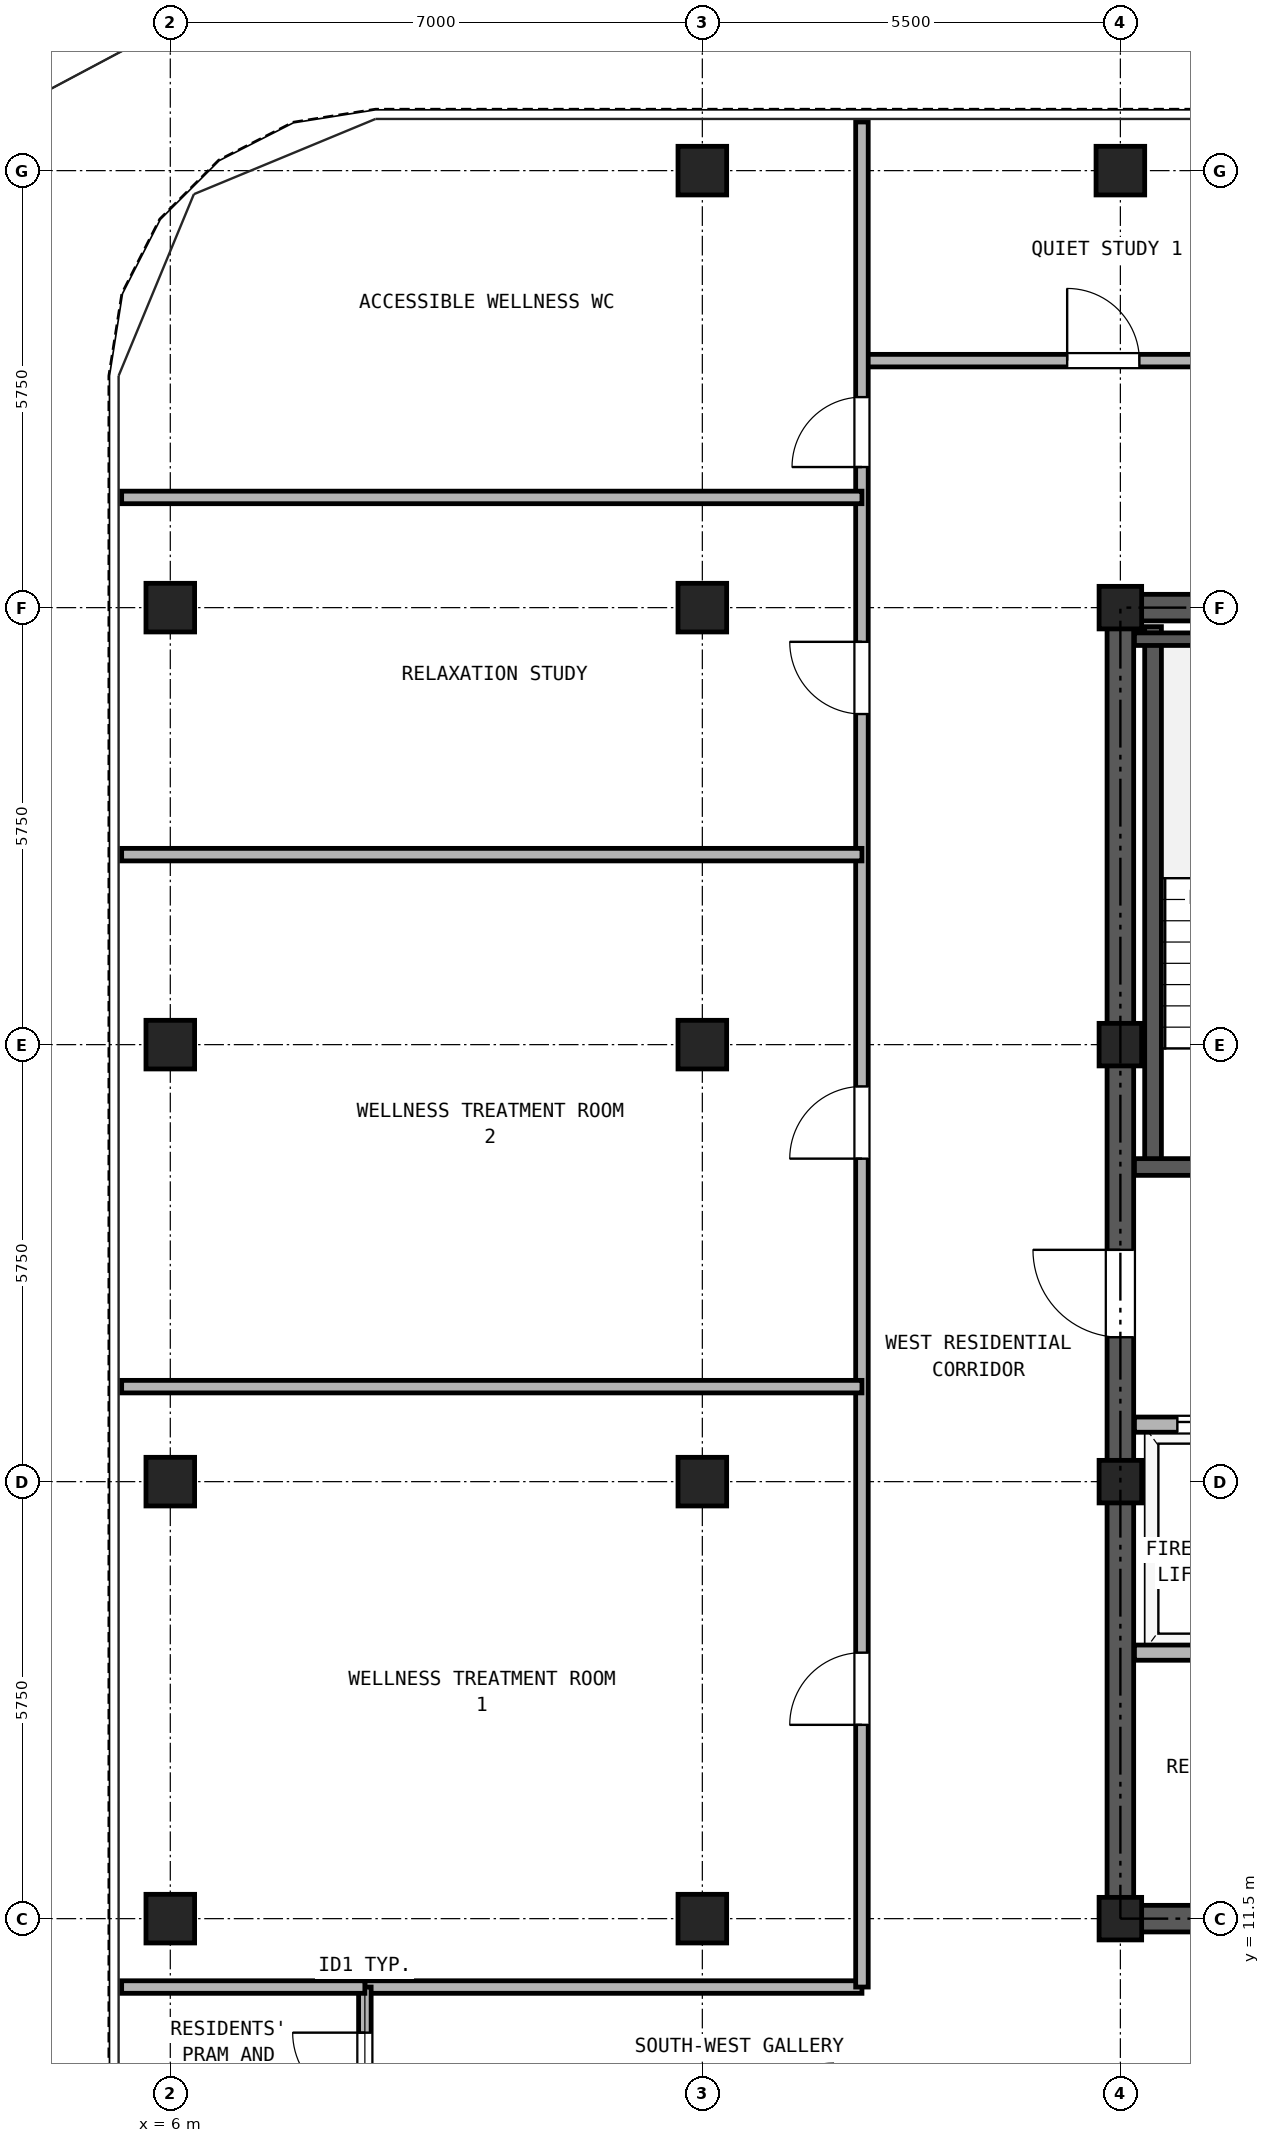
"""IFC4 building model, lengths in metres.
Left out: names, types, materials, properties, quantities, classifications, styles, units other than length and angle.
Written with IfcOpenShell. Run it as: python <this file> out.ifc"""

import sys

from ifc_helpers import new_model, si_unit, direction, frame, frame_2d, origin, origin_2d, place, context, subcontext, project, spatial, rectangle, hollow_rectangle, extrude, source, transform, mapped, element, fill, save


model = new_model("IFC4")
c1 = context("Model", 3, precision=1e-05, world=origin(), true_north=direction((0.0, 1.0)))
c2 = subcontext(c1, "Body", "Model", "MODEL_VIEW")
j1 = project(units=[si_unit("LENGTHUNIT", "METRE"), si_unit("PLANEANGLEUNIT", "RADIAN")], contexts=[c1])
p1 = place(None, origin())
s1 = spatial("IfcSite", under=j1, at=p1, CompositionType="ELEMENT")
p2 = place(p1, origin())
s2 = spatial("IfcBuilding", under=s1, at=p2, CompositionType="ELEMENT")
p3 = place(p2, frame((0.0, 0.0, 255.3)))
s3 = spatial("IfcBuildingStorey", under=s2, at=p3, CompositionType="ELEMENT", Elevation=255.3)
m1 = source(origin(), c2, "Body", "SweptSolid", [
    extrude(hollow_rectangle(XDim=0.64, YDim=0.64, WallThickness=0.035, at=origin_2d()), origin(), (0.0, 0.0, 1.0), 2.98),
])
for number, where, z_axis, x_axis in (
    (1, (13.0, 34.5, 0.0), (0.0, 0.0, 1.0), (1.0, 0.0, 0.0)),
    (2, (18.5, 34.5, 0.0), (0.0, 0.0, 1.0), (1.0, 0.0, 0.0)),
    (3, (6.0, 11.5, 0.0), (0.0, 0.0, 1.0), (1.0, 0.0, 0.0)),
    (4, (6.0, 17.25, 0.0), (0.0, 0.0, 1.0), (1.0, 0.0, 0.0)),
    (5, (6.0, 23.0, 0.0), (0.0, 0.0, 1.0), (1.0, 0.0, 0.0)),
    (6, (6.0, 28.75, 0.0), (0.0, 0.0, 1.0), (1.0, 0.0, 0.0)),
    (7, (13.0, 11.5, 0.0), (0.0, 0.0, 1.0), (1.0, 0.0, 0.0)),
    (8, (13.0, 17.25, 0.0), (0.0, 0.0, 1.0), (1.0, 0.0, 0.0)),
    (9, (13.0, 23.0, 0.0), (0.0, 0.0, 1.0), (1.0, 0.0, 0.0)),
    (10, (13.0, 28.75, 0.0), (0.0, 0.0, 1.0), (1.0, 0.0, 0.0)),
):
    element("IfcColumn", number, at=place(p3, frame(where, z_axis=z_axis, x_axis=x_axis)), inside=s3, PredefinedType="COLUMN", context=c2, shape_type="MappedRepresentation", body=[
        mapped(m1, transform((0.0, 0.0, 0.0), x_axis=(1.0, 0.0, 0.0), y_axis=(0.0, 1.0, 0.0), z_axis=(0.0, 0.0, 1.0), scale=1.0)),
    ])
m2 = source(origin(), c2, "Body", "SweptSolid", [
    extrude(hollow_rectangle(XDim=0.56, YDim=0.56, WallThickness=0.03, at=origin_2d()), origin(), (0.0, 0.0, 1.0), 2.98),
])
for number, where, z_axis, x_axis in (
    (11, (18.5, 11.5, 0.0), (0.0, 0.0, 1.0), (1.0, 0.0, 0.0)),
    (12, (18.5, 17.25, 0.0), (0.0, 0.0, 1.0), (1.0, 0.0, 0.0)),
    (13, (18.5, 23.0, 0.0), (0.0, 0.0, 1.0), (1.0, 0.0, 0.0)),
    (14, (18.5, 28.75, 0.0), (0.0, 0.0, 1.0), (1.0, 0.0, 0.0)),
):
    element("IfcColumn", number, at=place(p3, frame(where, z_axis=z_axis, x_axis=x_axis)), inside=s3, PredefinedType="COLUMN", context=c2, shape_type="MappedRepresentation", body=[
        mapped(m2, transform((0.0, 0.0, 0.0), x_axis=(1.0, 0.0, 0.0), y_axis=(0.0, 1.0, 0.0), z_axis=(0.0, 0.0, 1.0), scale=1.0)),
    ])
p4 = place(p3, frame((18.325, 11.5, 0.0), z_axis=(0.0, 0.0, 1.0), x_axis=(1.0, 0.0, 0.0)))
e15 = element("IfcWall", 15, at=p4, inside=s3, PredefinedType="SHEAR", context=c2, shape_type="SweptSolid", body=[
    extrude(rectangle(XDim=10.35, YDim=0.35, at=frame_2d((5.175, 0.0))), origin(), (0.0, 0.0, 1.0), 2.98),
])
p5 = place(p4, frame((1.775, 0.0, 0.0)))
e16 = element("IfcOpeningElement", 16, at=p5, cuts=e15, PredefinedType="OPENING", context=c2, shape_type="SweptSolid", body=[
    extrude(rectangle(XDim=0.95, YDim=2.15, at=frame_2d((0.475, 1.075))), frame((0.0, 0.185, 0.0), z_axis=(0.0, -1.0, 0.0), x_axis=(1.0, 0.0, 0.0)), (0.0, 0.0, 1.0), 0.37),
])
p6 = place(p4, frame((5.275, 0.0, 0.0)))
e17 = element("IfcOpeningElement", 17, at=p6, cuts=e15, PredefinedType="OPENING", context=c2, shape_type="SweptSolid", body=[
    extrude(rectangle(XDim=0.95, YDim=2.15, at=frame_2d((0.475, 1.075))), frame((0.0, 0.185, 0.0), z_axis=(0.0, -1.0, 0.0), x_axis=(1.0, 0.0, 0.0)), (0.0, 0.0, 1.0), 0.37),
])
p7 = place(p4, frame((8.175, 0.0, 0.0)))
e18 = element("IfcOpeningElement", 18, at=p7, cuts=e15, PredefinedType="OPENING", context=c2, shape_type="SweptSolid", body=[
    extrude(rectangle(XDim=1.1, YDim=2.25, at=frame_2d((0.55, 1.125))), frame((0.0, 0.185, 0.0), z_axis=(0.0, -1.0, 0.0), x_axis=(1.0, 0.0, 0.0)), (0.0, 0.0, 1.0), 0.37),
])
p8 = place(p3, frame((18.325, 28.75, 0.0), z_axis=(0.0, 0.0, 1.0), x_axis=(1.0, 0.0, 0.0)))
e19 = element("IfcWall", 19, at=p8, inside=s3, PredefinedType="SHEAR", context=c2, shape_type="SweptSolid", body=[
    extrude(rectangle(XDim=10.35, YDim=0.35, at=frame_2d((5.175, 0.0))), origin(), (0.0, 0.0, 1.0), 2.98),
])
p9 = place(p8, frame((4.055, 0.0, 0.0)))
e20 = element("IfcOpeningElement", 20, at=p9, cuts=e19, PredefinedType="OPENING", context=c2, shape_type="SweptSolid", body=[
    extrude(rectangle(XDim=0.9, YDim=2.05, at=frame_2d((0.45, 1.025))), frame((0.0, 0.185, 0.0), z_axis=(0.0, -1.0, 0.0), x_axis=(1.0, 0.0, 0.0)), (0.0, 0.0, 1.0), 0.37),
])
p10 = place(p8, frame((5.595, 0.0, 0.0)))
e21 = element("IfcOpeningElement", 21, at=p10, cuts=e19, PredefinedType="OPENING", context=c2, shape_type="SweptSolid", body=[
    extrude(rectangle(XDim=0.9, YDim=2.05, at=frame_2d((0.45, 1.025))), frame((0.0, 0.185, 0.0), z_axis=(0.0, -1.0, 0.0), x_axis=(1.0, 0.0, 0.0)), (0.0, 0.0, 1.0), 0.37),
])
p11 = place(p3, frame((18.5, 11.675, 0.0), z_axis=(0.0, 0.0, 1.0), x_axis=(0.0, 1.0, 0.0)))
e22 = element("IfcWall", 22, at=p11, inside=s3, PredefinedType="SHEAR", context=c2, shape_type="SweptSolid", body=[
    extrude(rectangle(XDim=16.9, YDim=0.35, at=frame_2d((8.45, 0.0))), origin(), (0.0, 0.0, 1.0), 2.98),
])
p12 = place(p11, frame((7.475, 0.0, 0.0)))
e23 = element("IfcOpeningElement", 23, at=p12, cuts=e22, PredefinedType="OPENING", context=c2, shape_type="SweptSolid", body=[
    extrude(rectangle(XDim=1.15, YDim=2.2, at=frame_2d((0.575, 1.1))), frame((0.0, 0.185, 0.0), z_axis=(0.0, -1.0, 0.0), x_axis=(1.0, 0.0, 0.0)), (0.0, 0.0, 1.0), 0.37),
])
p13 = place(p3, frame((18.93, 21.39, 0.0), z_axis=(0.0, 0.0, 1.0), x_axis=(0.0, 1.0, 0.0)))
e24 = element("IfcWall", 24, at=p13, inside=s3, PredefinedType="SOLIDWALL", context=c2, shape_type="SweptSolid", body=[
    extrude(rectangle(XDim=7.11, YDim=0.22, at=frame_2d((3.555, 0.0))), origin(), (0.0, 0.0, 1.0), 2.98),
])
p14 = place(p3, frame((18.685, 28.335, 0.0), z_axis=(0.0, 0.0, 1.0), x_axis=(1.0, 0.0, 0.0)))
e25 = element("IfcWall", 25, at=p14, inside=s3, PredefinedType="PARTITIONING", context=c2, shape_type="SweptSolid", body=[
    extrude(rectangle(XDim=3.425, YDim=0.165, at=frame_2d((1.712, 0.0))), origin(), (0.0, 0.0, 1.0), 2.98),
])
p15 = place(p3, frame((18.685, 21.39, 0.0), z_axis=(0.0, 0.0, 1.0), x_axis=(1.0, 0.0, 0.0)))
e26 = element("IfcWall", 26, at=p15, inside=s3, PredefinedType="SOLIDWALL", context=c2, shape_type="SweptSolid", body=[
    extrude(rectangle(XDim=6.445, YDim=0.22, at=frame_2d((3.222, 0.0))), origin(), (0.0, 0.0, 1.0), 2.98),
])
p16 = place(p15, frame((1.165, 0.0, 0.0)))
e27 = element("IfcOpeningElement", 27, at=p16, cuts=e26, PredefinedType="OPENING", context=c2, shape_type="SweptSolid", body=[
    extrude(rectangle(XDim=1.15, YDim=2.2, at=frame_2d((0.575, 1.1))), frame((0.0, 0.12, 0.0), z_axis=(0.0, -1.0, 0.0), x_axis=(1.0, 0.0, 0.0)), (0.0, 0.0, 1.0), 0.24),
])
p17 = place(p15, frame((4.895, 0.0, 0.0)))
e28 = element("IfcOpeningElement", 28, at=p17, cuts=e26, PredefinedType="OPENING", context=c2, shape_type="SweptSolid", body=[
    extrude(rectangle(XDim=1.1, YDim=2.25, at=frame_2d((0.55, 1.125))), frame((0.0, 0.12, 0.0), z_axis=(0.0, -1.0, 0.0), x_axis=(1.0, 0.0, 0.0)), (0.0, 0.0, 1.0), 0.24),
])
p18 = place(p3, frame((18.685, 18.0, 0.0), z_axis=(0.0, 0.0, 1.0), x_axis=(1.0, 0.0, 0.0)))
e29 = element("IfcWall", 29, at=p18, inside=s3, PredefinedType="PARTITIONING", context=c2, shape_type="SweptSolid", body=[
    extrude(rectangle(XDim=9.63, YDim=0.2, at=frame_2d((4.815, 0.0))), origin(), (0.0, 0.0, 1.0), 2.98),
])
p19 = place(p18, frame((0.565, 0.0, 0.0)))
e30 = element("IfcOpeningElement", 30, at=p19, cuts=e29, PredefinedType="OPENING", context=c2, shape_type="SweptSolid", body=[
    extrude(rectangle(XDim=1.3, YDim=2.3, at=frame_2d((0.65, 1.15))), frame((0.0, 0.11, 0.0), z_axis=(0.0, -1.0, 0.0), x_axis=(1.0, 0.0, 0.0)), (0.0, 0.0, 1.0), 0.22),
])
p20 = place(p18, frame((2.665, 0.0, 0.0)))
e31 = element("IfcOpeningElement", 31, at=p20, cuts=e29, PredefinedType="OPENING", context=c2, shape_type="SweptSolid", body=[
    extrude(rectangle(XDim=1.3, YDim=2.3, at=frame_2d((0.65, 1.15))), frame((0.0, 0.11, 0.0), z_axis=(0.0, -1.0, 0.0), x_axis=(1.0, 0.0, 0.0)), (0.0, 0.0, 1.0), 0.22),
])
p21 = place(p18, frame((7.165, 0.0, 0.0)))
e32 = element("IfcOpeningElement", 32, at=p21, cuts=e29, PredefinedType="OPENING", context=c2, shape_type="SweptSolid", body=[
    extrude(rectangle(XDim=1.0, YDim=2.15, at=frame_2d((0.5, 1.075))), frame((0.0, 0.11, 0.0), z_axis=(0.0, -1.0, 0.0), x_axis=(1.0, 0.0, 0.0)), (0.0, 0.0, 1.0), 0.22),
])
p22 = place(p3, frame((18.685, 15.0, 0.0), z_axis=(0.0, 0.0, 1.0), x_axis=(1.0, 0.0, 0.0)))
e33 = element("IfcWall", 33, at=p22, inside=s3, PredefinedType="PARTITIONING", context=c2, shape_type="SweptSolid", body=[
    extrude(rectangle(XDim=9.63, YDim=0.2, at=frame_2d((4.815, 0.0))), origin(), (0.0, 0.0, 1.0), 2.98),
])
p23 = place(p3, frame((8.56, 10.6, 0.0), z_axis=(0.0, 0.0, 1.0), x_axis=(1.0, 0.0, 0.0)))
e34 = element("IfcWall", 34, at=p23, inside=s3, PredefinedType="PARTITIONING", context=c2, shape_type="SweptSolid", body=[
    extrude(rectangle(XDim=6.54, YDim=0.165, at=frame_2d((3.27, 0.0))), origin(), (0.0, 0.0, 1.0), 2.98),
])
p24 = place(p3, frame((8.56, 8.6, 0.0), z_axis=(0.0, 0.0, 1.0), x_axis=(0.0, 1.0, 0.0)))
e35 = element("IfcWall", 35, at=p24, inside=s3, PredefinedType="PARTITIONING", context=c2, shape_type="SweptSolid", body=[
    extrude(rectangle(XDim=2.0, YDim=0.165, at=frame_2d((1.0, 0.0))), origin(), (0.0, 0.0, 1.0), 2.98),
])
p25 = place(p24, frame((0.45, 0.0, 0.0)))
e36 = element("IfcOpeningElement", 36, at=p25, cuts=e35, PredefinedType="OPENING", context=c2, shape_type="SweptSolid", body=[
    extrude(rectangle(XDim=0.95, YDim=2.15, at=frame_2d((0.475, 1.075))), frame((0.0, 0.093, 0.0), z_axis=(0.0, -1.0, 0.0), x_axis=(1.0, 0.0, 0.0)), (0.0, 0.0, 1.0), 0.185),
])
p26 = place(p3, frame((15.1, 32.0, 0.0), z_axis=(0.0, 0.0, 1.0), x_axis=(1.0, 0.0, 0.0)))
e37 = element("IfcWall", 37, at=p26, inside=s3, PredefinedType="PARTITIONING", context=c2, shape_type="SweptSolid", body=[
    extrude(rectangle(XDim=16.8, YDim=0.165, at=frame_2d((8.4, 0.0))), origin(), (0.0, 0.0, 1.0), 2.98),
])
p27 = place(p26, frame((2.7, 0.0, 0.0)))
e38 = element("IfcOpeningElement", 38, at=p27, cuts=e37, PredefinedType="OPENING", context=c2, shape_type="SweptSolid", body=[
    extrude(rectangle(XDim=0.95, YDim=2.15, at=frame_2d((0.475, 1.075))), frame((0.0, 0.093, 0.0), z_axis=(0.0, -1.0, 0.0), x_axis=(1.0, 0.0, 0.0)), (0.0, 0.0, 1.0), 0.185),
])
p28 = place(p26, frame((8.1, 0.0, 0.0)))
e39 = element("IfcOpeningElement", 39, at=p28, cuts=e37, PredefinedType="OPENING", context=c2, shape_type="SweptSolid", body=[
    extrude(rectangle(XDim=0.95, YDim=2.15, at=frame_2d((0.475, 1.075))), frame((0.0, 0.093, 0.0), z_axis=(0.0, -1.0, 0.0), x_axis=(1.0, 0.0, 0.0)), (0.0, 0.0, 1.0), 0.185),
])
p29 = place(p26, frame((13.3, 0.0, 0.0)))
e40 = element("IfcOpeningElement", 40, at=p29, cuts=e37, PredefinedType="OPENING", context=c2, shape_type="SweptSolid", body=[
    extrude(rectangle(XDim=0.92, YDim=2.1, at=frame_2d((0.46, 1.05))), frame((0.0, 0.093, 0.0), z_axis=(0.0, -1.0, 0.0), x_axis=(1.0, 0.0, 0.0)), (0.0, 0.0, 1.0), 0.185),
])
p30 = place(p3, frame((15.1, 10.6, 0.0), z_axis=(0.0, 0.0, 1.0), x_axis=(0.0, 1.0, 0.0)))
e41 = element("IfcWall", 41, at=p30, inside=s3, PredefinedType="PARTITIONING", context=c2, shape_type="SweptSolid", body=[
    extrude(rectangle(XDim=24.54, YDim=0.165, at=frame_2d((12.27, 0.0))), origin(), (0.0, 0.0, 1.0), 2.98),
])
p31 = place(p30, frame((3.45, 0.0, 0.0)))
e42 = element("IfcOpeningElement", 42, at=p31, cuts=e41, PredefinedType="OPENING", context=c2, shape_type="SweptSolid", body=[
    extrude(rectangle(XDim=0.95, YDim=2.15, at=frame_2d((0.475, 1.075))), frame((0.0, 0.093, 0.0), z_axis=(0.0, -1.0, 0.0), x_axis=(1.0, 0.0, 0.0)), (0.0, 0.0, 1.0), 0.185),
])
p32 = place(p30, frame((10.9, 0.0, 0.0)))
e43 = element("IfcOpeningElement", 43, at=p32, cuts=e41, PredefinedType="OPENING", context=c2, shape_type="SweptSolid", body=[
    extrude(rectangle(XDim=0.95, YDim=2.15, at=frame_2d((0.475, 1.075))), frame((0.0, 0.093, 0.0), z_axis=(0.0, -1.0, 0.0), x_axis=(1.0, 0.0, 0.0)), (0.0, 0.0, 1.0), 0.185),
])
p33 = place(p30, frame((16.75, 0.0, 0.0)))
e44 = element("IfcOpeningElement", 44, at=p33, cuts=e41, PredefinedType="OPENING", context=c2, shape_type="SweptSolid", body=[
    extrude(rectangle(XDim=0.95, YDim=2.15, at=frame_2d((0.475, 1.075))), frame((0.0, 0.093, 0.0), z_axis=(0.0, -1.0, 0.0), x_axis=(1.0, 0.0, 0.0)), (0.0, 0.0, 1.0), 0.185),
])
p34 = place(p30, frame((20.0, 0.0, 0.0)))
e45 = element("IfcOpeningElement", 45, at=p34, cuts=e41, PredefinedType="OPENING", context=c2, shape_type="SweptSolid", body=[
    extrude(rectangle(XDim=0.92, YDim=2.1, at=frame_2d((0.46, 1.05))), frame((0.0, 0.093, 0.0), z_axis=(0.0, -1.0, 0.0), x_axis=(1.0, 0.0, 0.0)), (0.0, 0.0, 1.0), 0.185),
])
p35 = place(p3, frame((5.36, 10.6, 0.0), z_axis=(0.0, 0.0, 1.0), x_axis=(1.0, 0.0, 0.0)))
e46 = element("IfcWall", 46, at=p35, inside=s3, PredefinedType="PARTITIONING", context=c2, shape_type="SweptSolid", body=[
    extrude(rectangle(XDim=3.2, YDim=0.165, at=frame_2d((1.6, 0.0))), origin(), (0.0, 0.0, 1.0), 2.98),
])
for number, where, z_axis, x_axis in (
    (47, (5.36, 18.5, 0.0), (0.0, 0.0, 1.0), (1.0, 0.0, 0.0)),
    (48, (5.36, 25.5, 0.0), (0.0, 0.0, 1.0), (1.0, 0.0, 0.0)),
    (49, (5.36, 30.2, 0.0), (0.0, 0.0, 1.0), (1.0, 0.0, 0.0)),
):
    element("IfcWall", number, at=place(p3, frame(where, z_axis=z_axis, x_axis=x_axis)), inside=s3, PredefinedType="PARTITIONING", context=c2, shape_type="SweptSolid", body=[
        extrude(rectangle(XDim=9.74, YDim=0.165, at=frame_2d((4.87, 0.0))), origin(), (0.0, 0.0, 1.0), 2.98),
    ])
p36 = place(p19, origin())
e50 = element("IfcDoor", 50, at=p36, inside=s3, OperationType="DOUBLE_DOOR_SLIDING", PredefinedType="DOOR", context=c2, shape_type="SweptSolid", body=[
    extrude(rectangle(XDim=1.3, YDim=2.3, at=frame_2d((0.65, 1.15))), frame((0.0, 0.025, 0.0), z_axis=(0.0, -1.0, 0.0), x_axis=(1.0, 0.0, 0.0)), (0.0, 0.0, 1.0), 0.05),
])
fill(e30, e50)
p37 = place(p12, frame((1.15, 0.0, 0.0), z_axis=(0.0, 0.0, 1.0), x_axis=(-1.0, 0.0, 0.0)))
e51 = element("IfcDoor", 51, at=p37, inside=s3, OperationType="SINGLE_SWING_RIGHT", PredefinedType="DOOR", context=c2, shape_type="SweptSolid", body=[
    extrude(rectangle(XDim=1.15, YDim=2.2, at=frame_2d((0.575, 1.1))), frame((0.0, 0.025, 0.0), z_axis=(0.0, -1.0, 0.0), x_axis=(1.0, 0.0, 0.0)), (0.0, 0.0, 1.0), 0.05),
])
fill(e23, e51)
p38 = place(p25, frame((0.95, 0.0, 0.0), z_axis=(0.0, 0.0, 1.0), x_axis=(-1.0, 0.0, 0.0)))
e52 = element("IfcDoor", 52, at=p38, inside=s3, OperationType="SINGLE_SWING_RIGHT", PredefinedType="DOOR", context=c2, shape_type="SweptSolid", body=[
    extrude(rectangle(XDim=0.95, YDim=2.15, at=frame_2d((0.475, 1.075))), frame((0.0, 0.025, 0.0), z_axis=(0.0, -1.0, 0.0), x_axis=(1.0, 0.0, 0.0)), (0.0, 0.0, 1.0), 0.05),
])
fill(e36, e52)
p39 = place(p31, frame((0.95, 0.0, 0.0), z_axis=(0.0, 0.0, 1.0), x_axis=(-1.0, 0.0, 0.0)))
e53 = element("IfcDoor", 53, at=p39, inside=s3, OperationType="SINGLE_SWING_LEFT", PredefinedType="DOOR", context=c2, shape_type="SweptSolid", body=[
    extrude(rectangle(XDim=0.95, YDim=2.15, at=frame_2d((0.475, 1.075))), frame((0.0, 0.025, 0.0), z_axis=(0.0, -1.0, 0.0), x_axis=(1.0, 0.0, 0.0)), (0.0, 0.0, 1.0), 0.05),
])
fill(e42, e53)
p40 = place(p32, frame((0.95, 0.0, 0.0), z_axis=(0.0, 0.0, 1.0), x_axis=(-1.0, 0.0, 0.0)))
e54 = element("IfcDoor", 54, at=p40, inside=s3, OperationType="SINGLE_SWING_LEFT", PredefinedType="DOOR", context=c2, shape_type="SweptSolid", body=[
    extrude(rectangle(XDim=0.95, YDim=2.15, at=frame_2d((0.475, 1.075))), frame((0.0, 0.025, 0.0), z_axis=(0.0, -1.0, 0.0), x_axis=(1.0, 0.0, 0.0)), (0.0, 0.0, 1.0), 0.05),
])
fill(e43, e54)
p41 = place(p33, frame((0.95, 0.0, 0.0), z_axis=(0.0, 0.0, 1.0), x_axis=(-1.0, 0.0, 0.0)))
e55 = element("IfcDoor", 55, at=p41, inside=s3, OperationType="SINGLE_SWING_RIGHT", PredefinedType="DOOR", context=c2, shape_type="SweptSolid", body=[
    extrude(rectangle(XDim=0.95, YDim=2.15, at=frame_2d((0.475, 1.075))), frame((0.0, 0.025, 0.0), z_axis=(0.0, -1.0, 0.0), x_axis=(1.0, 0.0, 0.0)), (0.0, 0.0, 1.0), 0.05),
])
fill(e44, e55)
p42 = place(p34, frame((0.92, 0.0, 0.0), z_axis=(0.0, 0.0, 1.0), x_axis=(-1.0, 0.0, 0.0)))
e56 = element("IfcDoor", 56, at=p42, inside=s3, OperationType="SINGLE_SWING_LEFT", PredefinedType="DOOR", context=c2, shape_type="SweptSolid", body=[
    extrude(rectangle(XDim=0.92, YDim=2.1, at=frame_2d((0.46, 1.05))), frame((0.0, 0.025, 0.0), z_axis=(0.0, -1.0, 0.0), x_axis=(1.0, 0.0, 0.0)), (0.0, 0.0, 1.0), 0.05),
])
fill(e45, e56)
p43 = place(p27, origin())
e57 = element("IfcDoor", 57, at=p43, inside=s3, OperationType="SINGLE_SWING_LEFT", PredefinedType="DOOR", context=c2, shape_type="SweptSolid", body=[
    extrude(rectangle(XDim=0.95, YDim=2.15, at=frame_2d((0.475, 1.075))), frame((0.0, 0.025, 0.0), z_axis=(0.0, -1.0, 0.0), x_axis=(1.0, 0.0, 0.0)), (0.0, 0.0, 1.0), 0.05),
])
fill(e38, e57)
save(model, sys.argv[1])
